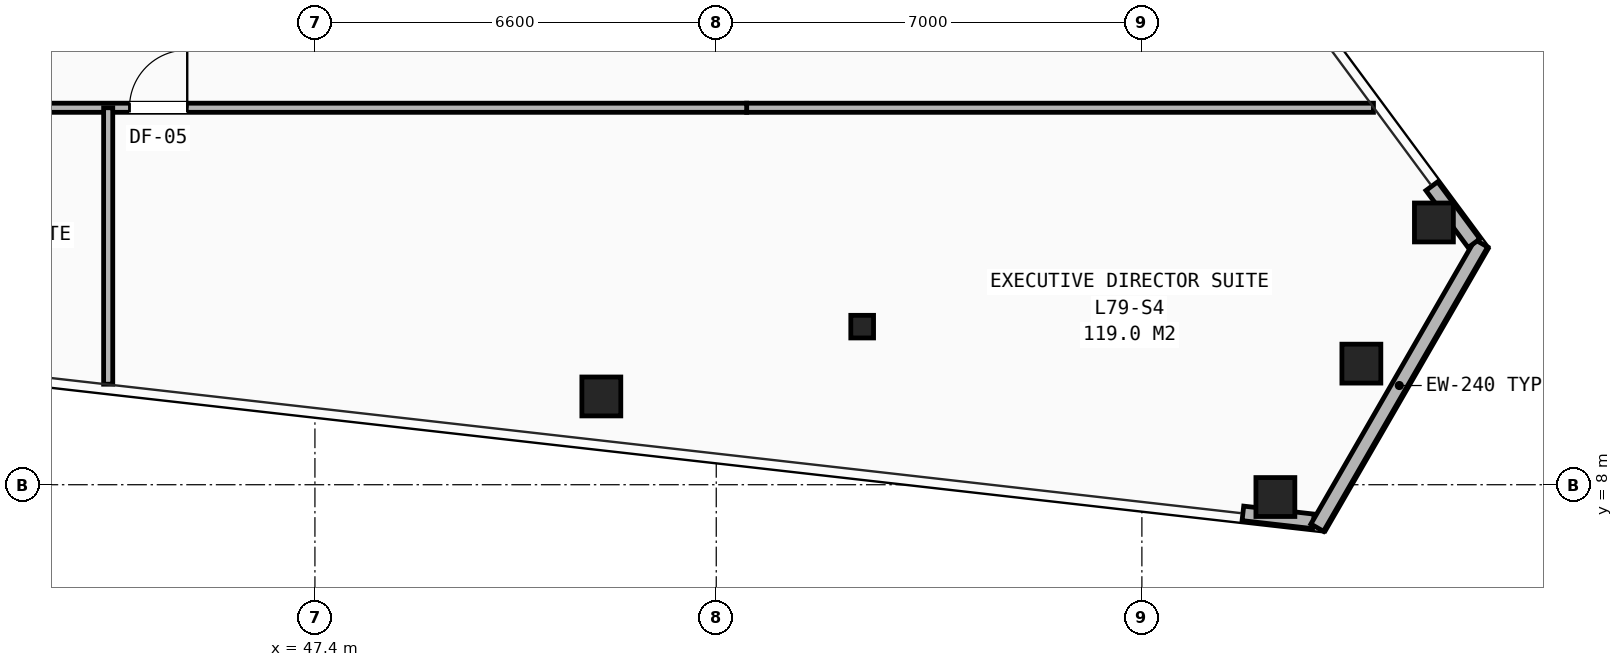
"""IFC4 building model, lengths in metres.
Left out: names, types, materials, properties, quantities, classifications, styles, units other than length and angle.
Written with IfcOpenShell. Run it as: python <this file> out.ifc"""

import sys

from ifc_helpers import new_model, si_unit, direction, frame, frame_2d, origin, origin_2d, place, context, subcontext, project, spatial, rectangle, hollow_rectangle, i_section, extrude, element, fill, save


model = new_model("IFC4")
c1 = context("Model", 3, precision=1e-05, world=origin(), true_north=direction((0.0, 1.0)))
c2 = subcontext(c1, "Body", "Model", "MODEL_VIEW")
j1 = project(units=[si_unit("LENGTHUNIT", "METRE"), si_unit("PLANEANGLEUNIT", "RADIAN")], contexts=[c1])
p1 = place(None, origin())
s1 = spatial("IfcSite", under=j1, at=p1, CompositionType="ELEMENT")
p2 = place(p1, origin())
s2 = spatial("IfcBuilding", under=s1, at=p2, CompositionType="ELEMENT")
p3 = place(p2, frame((0.0, 0.0, 279.5)))
s3 = spatial("IfcBuildingStorey", under=s2, at=p3, CompositionType="ELEMENT", Elevation=279.5)
p4 = place(p3, frame((56.4, 10.6, 0.0), z_axis=(0.0, 0.0, 1.0), x_axis=(1.0, 0.0, 0.0)))
e1 = element("IfcColumn", 1, at=p4, inside=s3, PredefinedType="COLUMN", context=c2, shape_type="SweptSolid", body=[
    extrude(i_section(OverallWidth=0.374, OverallDepth=0.372, WebThickness=0.016, FlangeThickness=0.026, at=origin_2d()), origin(), (0.0, 0.0, 1.0), 3.5),
])
for number, where, z_axis, x_axis in (
    (2, (52.11, 9.452, 0.0), (0.0, 0.0, 1.0), (1.0, 0.0, 0.0)),
    (3, (63.195, 7.798, 0.0), (0.0, 0.0, 1.0), (1.0, 0.0, 0.0)),
    (4, (64.61, 9.992, 0.0), (0.0, 0.0, 1.0), (1.0, 0.0, 0.0)),
    (5, (65.802, 12.313, 0.0), (0.0, 0.0, 1.0), (1.0, 0.0, 0.0)),
):
    element("IfcColumn", number, at=place(p3, frame(where, z_axis=z_axis, x_axis=x_axis)), inside=s3, PredefinedType="COLUMN", context=c2, shape_type="SweptSolid", body=[
        extrude(hollow_rectangle(XDim=0.64, YDim=0.64, WallThickness=0.045, at=origin_2d()), origin(), (0.0, 0.0, 1.0), 3.5),
    ])
p5 = place(p3, frame((62.661, 7.529, 0.0), z_axis=(0.0, 0.0, 1.0), x_axis=(0.993628691443, -0.112703254353, 0.0)))
e6 = element("IfcWall", 6, at=p5, inside=s3, PredefinedType="SHEAR", context=c2, shape_type="SweptSolid", body=[
    extrude(rectangle(XDim=1.167, YDim=0.24, at=frame_2d((0.584, 0.0))), origin(), (0.0, 0.0, 1.0), 2.623),
])
p6 = place(p3, frame((66.583, 11.97, 0.0), z_axis=(0.0, 0.0, 1.0), x_axis=(-0.49997552693, -0.866039532857, 0.0)))
e7 = element("IfcWall", 7, at=p6, inside=s3, PredefinedType="SHEAR", context=c2, shape_type="SweptSolid", body=[
    extrude(rectangle(XDim=5.4, YDim=0.24, at=frame_2d((2.7, 0.0))), origin(), (0.0, 0.0, 1.0), 2.623),
])
p7 = place(p3, frame((66.462, 11.972, 0.0), z_axis=(0.0, 0.0, 1.0), x_axis=(-0.594532170537, 0.804071824029, 0.0)))
e8 = element("IfcWall", 8, at=p7, inside=s3, PredefinedType="SHEAR", context=c2, shape_type="SweptSolid", body=[
    extrude(rectangle(XDim=1.167, YDim=0.24, at=frame_2d((0.584, 0.0))), origin(), (0.0, 0.0, 1.0), 2.623),
])
p8 = place(p3, frame((54.5, 14.2, 0.0), z_axis=(0.0, 0.0, 1.0), x_axis=(1.0, 0.0, 0.0)))
e9 = element("IfcWall", 9, at=p8, inside=s3, PredefinedType="PARTITIONING", context=c2, shape_type="SweptSolid", body=[
    extrude(rectangle(XDim=10.308, YDim=0.15, at=frame_2d((5.154, 0.0))), origin(), (0.0, 0.0, 1.0), 2.292),
])
p9 = place(p3, frame((25.5, 14.2, 0.0), z_axis=(0.0, 0.0, 1.0), x_axis=(1.0, 0.0, 0.0)))
e10 = element("IfcWall", 10, at=p9, inside=s3, PredefinedType="PARTITIONING", context=c2, shape_type="SweptSolid", body=[
    extrude(rectangle(XDim=29.0, YDim=0.15, at=frame_2d((14.5, 0.0))), origin(), (0.0, 0.0, 1.0), 2.292),
])
p10 = place(p9, frame((0.85, 0.0, 0.0)))
e11 = element("IfcOpeningElement", 11, at=p10, cuts=e10, PredefinedType="OPENING", context=c2, shape_type="SweptSolid", body=[
    extrude(rectangle(XDim=0.95, YDim=2.1, at=frame_2d((0.475, 1.05))), frame((0.0, 0.085, 0.0), z_axis=(0.0, -1.0, 0.0), x_axis=(1.0, 0.0, 0.0)), (0.0, 0.0, 1.0), 0.17),
])
p11 = place(p9, frame((9.05, 0.0, 0.0)))
e12 = element("IfcOpeningElement", 12, at=p11, cuts=e10, PredefinedType="OPENING", context=c2, shape_type="SweptSolid", body=[
    extrude(rectangle(XDim=0.95, YDim=2.1, at=frame_2d((0.475, 1.05))), frame((0.0, 0.085, 0.0), z_axis=(0.0, -1.0, 0.0), x_axis=(1.0, 0.0, 0.0)), (0.0, 0.0, 1.0), 0.17),
])
p12 = place(p9, frame((14.45, 0.0, 0.0)))
e13 = element("IfcOpeningElement", 13, at=p12, cuts=e10, PredefinedType="OPENING", context=c2, shape_type="SweptSolid", body=[
    extrude(rectangle(XDim=0.95, YDim=2.1, at=frame_2d((0.475, 1.05))), frame((0.0, 0.085, 0.0), z_axis=(0.0, -1.0, 0.0), x_axis=(1.0, 0.0, 0.0)), (0.0, 0.0, 1.0), 0.17),
])
p13 = place(p9, frame((18.85, 0.0, 0.0)))
e14 = element("IfcOpeningElement", 14, at=p13, cuts=e10, PredefinedType="OPENING", context=c2, shape_type="SweptSolid", body=[
    extrude(rectangle(XDim=0.95, YDim=2.1, at=frame_2d((0.475, 1.05))), frame((0.0, 0.085, 0.0), z_axis=(0.0, -1.0, 0.0), x_axis=(1.0, 0.0, 0.0)), (0.0, 0.0, 1.0), 0.17),
])
p14 = place(p3, frame((44.0, 9.653, 0.0), z_axis=(0.0, 0.0, 1.0), x_axis=(0.0, 1.0, 0.0)))
e15 = element("IfcWall", 15, at=p14, inside=s3, PredefinedType="PARTITIONING", context=c2, shape_type="SweptSolid", body=[
    extrude(rectangle(XDim=4.547, YDim=0.15, at=frame_2d((2.273, 0.0))), origin(), (0.0, 0.0, 1.0), 2.628),
])
p15 = place(p13, origin())
e16 = element("IfcDoor", 16, at=p15, inside=s3, OperationType="SINGLE_SWING_RIGHT", PredefinedType="DOOR", context=c2, shape_type="SweptSolid", body=[
    extrude(rectangle(XDim=0.95, YDim=2.1, at=frame_2d((0.475, 1.05))), frame((0.0, 0.025, 0.0), z_axis=(0.0, -1.0, 0.0), x_axis=(1.0, 0.0, 0.0)), (0.0, 0.0, 1.0), 0.05),
])
fill(e14, e16)
save(model, sys.argv[1])
